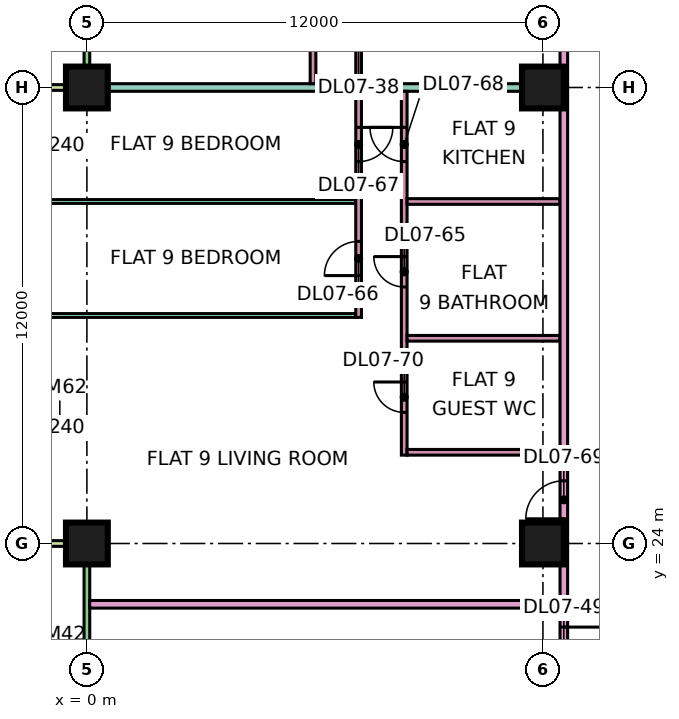
"""IFC4 building model, lengths in metres.
Left out: names, types, materials, properties, quantities, classifications, styles, units other than length and angle.
Written with IfcOpenShell. Run it as: python <this file> out.ifc"""

import sys

from ifc_helpers import new_model, si_unit, direction, frame, frame_2d, origin, origin_2d, place, context, subcontext, project, spatial, rectangle, extrude, element, fill, save


model = new_model("IFC4")
c1 = context("Model", 3, precision=1e-05, world=origin(), true_north=direction((0.0, 1.0)))
c2 = subcontext(c1, "Body", "Model", "MODEL_VIEW")
j1 = project(units=[si_unit("LENGTHUNIT", "METRE"), si_unit("PLANEANGLEUNIT", "RADIAN")], contexts=[c1])
p1 = place(None, origin())
s1 = spatial("IfcSite", under=j1, at=p1, CompositionType="ELEMENT")
p2 = place(p1, origin())
s2 = spatial("IfcBuilding", under=s1, at=p2, CompositionType="ELEMENT")
p3 = place(p2, frame((0.0, 0.0, 41.4)))
s3 = spatial("IfcBuildingStorey", under=s2, at=p3, CompositionType="ELEMENT", Elevation=41.4)
p4 = place(p3, frame((0.0, 24.0, 0.0), z_axis=(0.0, 0.0, 1.0), x_axis=(1.0, 0.0, 0.0)))
e1 = element("IfcColumn", 1, at=p4, inside=s3, PredefinedType="COLUMN", context=c2, shape_type="SweptSolid", body=[
    extrude(rectangle(XDim=1.1, YDim=1.1, at=origin_2d()), origin(), (0.0, 0.0, 1.0), 3.75),
])
p5 = place(p3, frame((0.0, 36.0, 0.0), z_axis=(0.0, 0.0, 1.0), x_axis=(1.0, 0.0, 0.0)))
e2 = element("IfcColumn", 2, at=p5, inside=s3, PredefinedType="COLUMN", context=c2, shape_type="SweptSolid", body=[
    extrude(rectangle(XDim=1.1, YDim=1.1, at=origin_2d()), origin(), (0.0, 0.0, 1.0), 3.75),
])
for number, where, z_axis, x_axis in (
    (3, (12.0, 24.0, 0.0), (0.0, 0.0, 1.0), (1.0, 0.0, 0.0)),
    (4, (12.0, 36.0, 0.0), (0.0, 0.0, 1.0), (1.0, 0.0, 0.0)),
):
    element("IfcColumn", number, at=place(p3, frame(where, z_axis=z_axis, x_axis=x_axis)), inside=s3, PredefinedType="COLUMN", context=c2, shape_type="SweptSolid", body=[
        extrude(rectangle(XDim=1.1, YDim=1.1, at=origin_2d()), origin(), (0.0, 0.0, 1.0), 3.75),
    ])
p6 = place(p3, frame((0.0, 47.925, 0.0), z_axis=(0.0, 0.0, 1.0), x_axis=(0.0, -1.0, 0.0)))
e5 = element("IfcWall", 5, at=p6, inside=s3, PredefinedType="SOLIDWALL", context=c2, shape_type="SweptSolid", body=[
    extrude(rectangle(XDim=11.85, YDim=0.15, at=frame_2d((5.925, 0.0))), origin(), (0.0, 0.0, 1.0), 3.35),
])
p7 = place(p6, frame((0.538, 0.0, 0.45)))
e6 = element("IfcOpeningElement", 6, at=p7, cuts=e5, PredefinedType="OPENING", context=c2, shape_type="SweptSolid", body=[
    extrude(rectangle(XDim=1.2, YDim=2.4, at=frame_2d((0.6, 1.2))), frame((0.0, 0.085, 0.0), z_axis=(0.0, -1.0, 0.0), x_axis=(1.0, 0.0, 0.0)), (0.0, 0.0, 1.0), 0.17),
])
p8 = place(p6, frame((5.35, 0.0, 0.0)))
e7 = element("IfcOpeningElement", 7, at=p8, cuts=e5, PredefinedType="OPENING", context=c2, shape_type="SweptSolid", body=[
    extrude(rectangle(XDim=1.8, YDim=2.4, at=frame_2d((0.9, 1.2))), frame((0.0, 0.085, 0.0), z_axis=(0.0, -1.0, 0.0), x_axis=(1.0, 0.0, 0.0)), (0.0, 0.0, 1.0), 0.17),
])
p9 = place(p6, frame((9.5, 0.0, 0.45)))
e8 = element("IfcOpeningElement", 8, at=p9, cuts=e5, PredefinedType="OPENING", context=c2, shape_type="SweptSolid", body=[
    extrude(rectangle(XDim=1.2, YDim=2.4, at=frame_2d((0.6, 1.2))), frame((0.0, 0.085, 0.0), z_axis=(0.0, -1.0, 0.0), x_axis=(1.0, 0.0, 0.0)), (0.0, 0.0, 1.0), 0.17),
])
p10 = place(p3, frame((-1.5, 36.0, 0.0), z_axis=(0.0, 0.0, 1.0), x_axis=(1.0, 0.0, 0.0)))
e9 = element("IfcWall", 9, at=p10, inside=s3, PredefinedType="SOLIDWALL", context=c2, shape_type="SweptSolid", body=[
    extrude(rectangle(XDim=1.5, YDim=0.15, at=frame_2d((0.75, 0.0))), origin(), (0.0, 0.0, 1.0), 3.35),
])
p11 = place(p3, frame((0.0, 23.925, 0.0), z_axis=(0.0, 0.0, 1.0), x_axis=(0.0, -1.0, 0.0)))
e10 = element("IfcWall", 10, at=p11, inside=s3, PredefinedType="SOLIDWALL", context=c2, shape_type="SweptSolid", body=[
    extrude(rectangle(XDim=11.35, YDim=0.15, at=frame_2d((5.675, 0.0))), origin(), (0.0, 0.0, 1.0), 3.35),
])
p12 = place(p11, frame((6.738, 0.0, 0.0)))
e11 = element("IfcOpeningElement", 11, at=p12, cuts=e10, PredefinedType="OPENING", context=c2, shape_type="SweptSolid", body=[
    extrude(rectangle(XDim=1.8, YDim=2.4, at=frame_2d((0.9, 1.2))), frame((0.0, 0.085, 0.0), z_axis=(0.0, -1.0, 0.0), x_axis=(1.0, 0.0, 0.0)), (0.0, 0.0, 1.0), 0.17),
])
p13 = place(p3, frame((-1.5, 24.0, 0.0), z_axis=(0.0, 0.0, 1.0), x_axis=(1.0, 0.0, 0.0)))
e12 = element("IfcWall", 12, at=p13, inside=s3, PredefinedType="SOLIDWALL", context=c2, shape_type="SweptSolid", body=[
    extrude(rectangle(XDim=1.5, YDim=0.15, at=frame_2d((0.75, 0.0))), origin(), (0.0, 0.0, 1.0), 3.35),
])
p14 = place(p3, frame((-1.351, 33.0, 0.0), z_axis=(0.0, 0.0, 1.0), x_axis=(1.0, 0.0, 0.0)))
e13 = element("IfcWall", 13, at=p14, inside=s3, PredefinedType="PARTITIONING", context=c2, shape_type="SweptSolid", body=[
    extrude(rectangle(XDim=8.426, YDim=0.1, at=frame_2d((4.213, 0.0))), origin(), (0.0, 0.0, 1.0), 3.35),
])
p15 = place(p3, frame((-1.35, 30.0, 0.0), z_axis=(0.0, 0.0, 1.0), x_axis=(1.0, 0.0, 0.0)))
e14 = element("IfcWall", 14, at=p15, inside=s3, PredefinedType="PARTITIONING", context=c2, shape_type="SweptSolid", body=[
    extrude(rectangle(XDim=8.425, YDim=0.1, at=frame_2d((4.212, 0.0))), origin(), (0.0, 0.0, 1.0), 3.35),
])
e15 = element("IfcWall", 15, at=p5, inside=s3, PredefinedType="PARTITIONING", context=c2, shape_type="SweptSolid", body=[
    extrude(rectangle(XDim=12.45, YDim=0.2, at=frame_2d((6.225, 0.0))), origin(), (0.0, 0.0, 1.0), 3.35),
])
p16 = place(p3, frame((0.074, 22.4, 0.0), z_axis=(0.0, 0.0, 1.0), x_axis=(1.0, 0.0, 0.0)))
e16 = element("IfcWall", 16, at=p16, inside=s3, PredefinedType="PARTITIONING", context=c2, shape_type="SweptSolid", body=[
    extrude(rectangle(XDim=12.376, YDim=0.2, at=frame_2d((6.188, 0.0))), origin(), (0.0, 0.0, 1.0), 3.35),
])
p17 = place(p3, frame((5.95, 36.1, 0.0), z_axis=(0.0, 0.0, 1.0), x_axis=(0.0, 1.0, 0.0)))
e17 = element("IfcWall", 17, at=p17, inside=s3, PredefinedType="PARTITIONING", context=c2, shape_type="SweptSolid", body=[
    extrude(rectangle(XDim=8.95, YDim=0.15, at=frame_2d((4.475, 0.0))), origin(), (0.0, 0.0, 1.0), 3.35),
])
p18 = place(p17, frame((0.95, 0.0, 0.0)))
e18 = element("IfcOpeningElement", 18, at=p18, cuts=e17, PredefinedType="OPENING", context=c2, shape_type="SweptSolid", body=[
    extrude(rectangle(XDim=0.9, YDim=2.1, at=frame_2d((0.45, 1.05))), frame((0.0, 0.085, 0.0), z_axis=(0.0, -1.0, 0.0), x_axis=(1.0, 0.0, 0.0)), (0.0, 0.0, 1.0), 0.17),
])
p19 = place(p17, frame((6.95, 0.0, 0.0)))
e19 = element("IfcOpeningElement", 19, at=p19, cuts=e17, PredefinedType="OPENING", context=c2, shape_type="SweptSolid", body=[
    extrude(rectangle(XDim=0.9, YDim=2.1, at=frame_2d((0.45, 1.05))), frame((0.0, 0.085, 0.0), z_axis=(0.0, -1.0, 0.0), x_axis=(1.0, 0.0, 0.0)), (0.0, 0.0, 1.0), 0.17),
])
p20 = place(p3, frame((7.15, 29.95, 0.0), z_axis=(0.0, 0.0, 1.0), x_axis=(0.0, 1.0, 0.0)))
e20 = element("IfcWall", 20, at=p20, inside=s3, PredefinedType="PARTITIONING", context=c2, shape_type="SweptSolid", body=[
    extrude(rectangle(XDim=5.95, YDim=0.15, at=frame_2d((2.975, 0.0))), origin(), (0.0, 0.0, 1.0), 3.35),
])
p21 = place(p20, frame((1.1, 0.0, 0.0)))
e21 = element("IfcOpeningElement", 21, at=p21, cuts=e20, PredefinedType="OPENING", context=c2, shape_type="SweptSolid", body=[
    extrude(rectangle(XDim=0.9, YDim=2.1, at=frame_2d((0.45, 1.05))), frame((0.0, 0.085, 0.0), z_axis=(0.0, -1.0, 0.0), x_axis=(1.0, 0.0, 0.0)), (0.0, 0.0, 1.0), 0.17),
])
p22 = place(p20, frame((4.1, 0.0, 0.0)))
e22 = element("IfcOpeningElement", 22, at=p22, cuts=e20, PredefinedType="OPENING", context=c2, shape_type="SweptSolid", body=[
    extrude(rectangle(XDim=0.9, YDim=2.1, at=frame_2d((0.45, 1.05))), frame((0.0, 0.085, 0.0), z_axis=(0.0, -1.0, 0.0), x_axis=(1.0, 0.0, 0.0)), (0.0, 0.0, 1.0), 0.17),
])
p23 = place(p3, frame((7.15, 36.1, 0.0), z_axis=(0.0, 0.0, 1.0), x_axis=(0.0, 1.0, 0.0)))
e23 = element("IfcWall", 23, at=p23, inside=s3, PredefinedType="PARTITIONING", context=c2, shape_type="SweptSolid", body=[
    extrude(rectangle(XDim=9.275, YDim=0.15, at=frame_2d((4.637, 0.0))), origin(), (0.0, 0.0, 1.0), 3.35),
])
p24 = place(p23, frame((7.4, 0.0, 0.0)))
e24 = element("IfcOpeningElement", 24, at=p24, cuts=e23, PredefinedType="OPENING", context=c2, shape_type="SweptSolid", body=[
    extrude(rectangle(XDim=0.8, YDim=2.1, at=frame_2d((0.4, 1.05))), frame((0.0, 0.085, 0.0), z_axis=(0.0, -1.0, 0.0), x_axis=(1.0, 0.0, 0.0)), (0.0, 0.0, 1.0), 0.17),
])
p25 = place(p23, frame((1.1, 0.0, 0.0)))
e25 = element("IfcOpeningElement", 25, at=p25, cuts=e23, PredefinedType="OPENING", context=c2, shape_type="SweptSolid", body=[
    extrude(rectangle(XDim=0.8, YDim=2.1, at=frame_2d((0.4, 1.05))), frame((0.0, 0.085, 0.0), z_axis=(0.0, -1.0, 0.0), x_axis=(1.0, 0.0, 0.0)), (0.0, 0.0, 1.0), 0.17),
])
p26 = place(p23, frame((4.4, 0.0, 0.0)))
e26 = element("IfcOpeningElement", 26, at=p26, cuts=e23, PredefinedType="OPENING", context=c2, shape_type="SweptSolid", body=[
    extrude(rectangle(XDim=0.8, YDim=2.1, at=frame_2d((0.4, 1.05))), frame((0.0, 0.085, 0.0), z_axis=(0.0, -1.0, 0.0), x_axis=(1.0, 0.0, 0.0)), (0.0, 0.0, 1.0), 0.17),
])
p27 = place(p3, frame((8.35, 26.325, 0.0), z_axis=(0.0, 0.0, 1.0), x_axis=(0.0, 1.0, 0.0)))
e27 = element("IfcWall", 27, at=p27, inside=s3, PredefinedType="PARTITIONING", context=c2, shape_type="SweptSolid", body=[
    extrude(rectangle(XDim=9.575, YDim=0.15, at=frame_2d((4.788, 0.0))), origin(), (0.0, 0.0, 1.0), 3.35),
])
p28 = place(p27, frame((4.425, 0.0, 0.0)))
e28 = element("IfcOpeningElement", 28, at=p28, cuts=e27, PredefinedType="OPENING", context=c2, shape_type="SweptSolid", body=[
    extrude(rectangle(XDim=0.8, YDim=2.1, at=frame_2d((0.4, 1.05))), frame((0.0, 0.085, 0.0), z_axis=(0.0, -1.0, 0.0), x_axis=(1.0, 0.0, 0.0)), (0.0, 0.0, 1.0), 0.17),
])
p29 = place(p27, frame((7.725, 0.0, 0.0)))
e29 = element("IfcOpeningElement", 29, at=p29, cuts=e27, PredefinedType="OPENING", context=c2, shape_type="SweptSolid", body=[
    extrude(rectangle(XDim=0.9, YDim=2.1, at=frame_2d((0.45, 1.05))), frame((0.0, 0.085, 0.0), z_axis=(0.0, -1.0, 0.0), x_axis=(1.0, 0.0, 0.0)), (0.0, 0.0, 1.0), 0.17),
])
p30 = place(p27, frame((1.125, 0.0, 0.0)))
e30 = element("IfcOpeningElement", 30, at=p30, cuts=e27, PredefinedType="OPENING", context=c2, shape_type="SweptSolid", body=[
    extrude(rectangle(XDim=0.8, YDim=2.1, at=frame_2d((0.4, 1.05))), frame((0.0, 0.085, 0.0), z_axis=(0.0, -1.0, 0.0), x_axis=(1.0, 0.0, 0.0)), (0.0, 0.0, 1.0), 0.17),
])
for number, where, z_axis, x_axis in (
    (31, (8.425, 26.4, 0.0), (0.0, 0.0, 1.0), (1.0, 0.0, 0.0)),
    (32, (8.425, 29.4, 0.0), (0.0, 0.0, 1.0), (1.0, 0.0, 0.0)),
    (33, (8.425, 33.0, 0.0), (0.0, 0.0, 1.0), (1.0, 0.0, 0.0)),
):
    element("IfcWall", number, at=place(p3, frame(where, z_axis=z_axis, x_axis=x_axis)), inside=s3, PredefinedType="PARTITIONING", context=c2, shape_type="SweptSolid", body=[
        extrude(rectangle(XDim=4.025, YDim=0.15, at=frame_2d((2.012, 0.0))), origin(), (0.0, 0.0, 1.0), 3.35),
    ])
p31 = place(p3, frame((12.55, 20.0, 0.0), z_axis=(0.0, 0.0, 1.0), x_axis=(0.0, 1.0, 0.0)))
e34 = element("IfcWall", 34, at=p31, inside=s3, PredefinedType="PARTITIONING", context=c2, shape_type="SweptSolid", body=[
    extrude(rectangle(XDim=42.926, YDim=0.2, at=frame_2d((21.463, 0.0))), origin(), (0.0, 0.0, 1.0), 3.35),
])
p32 = place(p31, frame((25.8, 0.0, 0.0)))
e35 = element("IfcOpeningElement", 35, at=p32, cuts=e34, PredefinedType="OPENING", context=c2, shape_type="SweptSolid", body=[
    extrude(rectangle(XDim=1.0, YDim=2.1, at=frame_2d((0.5, 1.05))), frame((0.0, 0.11, 0.0), z_axis=(0.0, -1.0, 0.0), x_axis=(1.0, 0.0, 0.0)), (0.0, 0.0, 1.0), 0.22),
])
p33 = place(p31, frame((37.65, 0.0, 0.0)))
e36 = element("IfcOpeningElement", 36, at=p33, cuts=e34, PredefinedType="OPENING", context=c2, shape_type="SweptSolid", body=[
    extrude(rectangle(XDim=1.0, YDim=2.1, at=frame_2d((0.5, 1.05))), frame((0.0, 0.11, 0.0), z_axis=(0.0, -1.0, 0.0), x_axis=(1.0, 0.0, 0.0)), (0.0, 0.0, 1.0), 0.22),
])
p34 = place(p31, frame((0.6, 0.0, 0.0)))
e37 = element("IfcOpeningElement", 37, at=p34, cuts=e34, PredefinedType="OPENING", context=c2, shape_type="SweptSolid", body=[
    extrude(rectangle(XDim=1.2, YDim=2.1, at=frame_2d((0.6, 1.05))), frame((0.0, 0.11, 0.0), z_axis=(0.0, -1.0, 0.0), x_axis=(1.0, 0.0, 0.0)), (0.0, 0.0, 1.0), 0.22),
])
p35 = place(p31, frame((4.65, 0.0, 0.0)))
e38 = element("IfcOpeningElement", 38, at=p35, cuts=e34, PredefinedType="OPENING", context=c2, shape_type="SweptSolid", body=[
    extrude(rectangle(XDim=1.0, YDim=2.1, at=frame_2d((0.5, 1.05))), frame((0.0, 0.11, 0.0), z_axis=(0.0, -1.0, 0.0), x_axis=(1.0, 0.0, 0.0)), (0.0, 0.0, 1.0), 0.22),
])
p36 = place(p34, origin())
e39 = element("IfcDoor", 39, at=p36, inside=s3, OperationType="SINGLE_SWING_RIGHT", PredefinedType="DOOR", context=c2, shape_type="SweptSolid", body=[
    extrude(rectangle(XDim=1.2, YDim=2.1, at=frame_2d((0.6, 1.05))), frame((0.0, 0.025, 0.0), z_axis=(0.0, -1.0, 0.0), x_axis=(1.0, 0.0, 0.0)), (0.0, 0.0, 1.0), 0.05),
])
fill(e37, e39)
p37 = place(p28, frame((0.8, 0.0, 0.0), z_axis=(0.0, 0.0, 1.0), x_axis=(-1.0, 0.0, 0.0)))
e40 = element("IfcDoor", 40, at=p37, inside=s3, OperationType="SINGLE_SWING_RIGHT", PredefinedType="DOOR", context=c2, shape_type="SweptSolid", body=[
    extrude(rectangle(XDim=0.8, YDim=2.1, at=frame_2d((0.4, 1.05))), frame((0.0, 0.025, 0.0), z_axis=(0.0, -1.0, 0.0), x_axis=(1.0, 0.0, 0.0)), (0.0, 0.0, 1.0), 0.05),
])
fill(e28, e40)
p38 = place(p21, origin())
e41 = element("IfcDoor", 41, at=p38, inside=s3, OperationType="SINGLE_SWING_LEFT", PredefinedType="DOOR", context=c2, shape_type="SweptSolid", body=[
    extrude(rectangle(XDim=0.9, YDim=2.1, at=frame_2d((0.45, 1.05))), frame((0.0, 0.025, 0.0), z_axis=(0.0, -1.0, 0.0), x_axis=(1.0, 0.0, 0.0)), (0.0, 0.0, 1.0), 0.05),
])
fill(e21, e41)
p39 = place(p22, origin())
e42 = element("IfcDoor", 42, at=p39, inside=s3, OperationType="SINGLE_SWING_RIGHT", PredefinedType="DOOR", context=c2, shape_type="SweptSolid", body=[
    extrude(rectangle(XDim=0.9, YDim=2.1, at=frame_2d((0.45, 1.05))), frame((0.0, 0.025, 0.0), z_axis=(0.0, -1.0, 0.0), x_axis=(1.0, 0.0, 0.0)), (0.0, 0.0, 1.0), 0.05),
])
fill(e22, e42)
p40 = place(p29, frame((0.9, 0.0, 0.0), z_axis=(0.0, 0.0, 1.0), x_axis=(-1.0, 0.0, 0.0)))
e43 = element("IfcDoor", 43, at=p40, inside=s3, OperationType="SINGLE_SWING_RIGHT", PredefinedType="DOOR", context=c2, shape_type="SweptSolid", body=[
    extrude(rectangle(XDim=0.9, YDim=2.1, at=frame_2d((0.45, 1.05))), frame((0.0, 0.025, 0.0), z_axis=(0.0, -1.0, 0.0), x_axis=(1.0, 0.0, 0.0)), (0.0, 0.0, 1.0), 0.05),
])
fill(e29, e43)
p41 = place(p35, origin())
e44 = element("IfcDoor", 44, at=p41, inside=s3, OperationType="SINGLE_SWING_LEFT", PredefinedType="DOOR", context=c2, shape_type="SweptSolid", body=[
    extrude(rectangle(XDim=1.0, YDim=2.1, at=frame_2d((0.5, 1.05))), frame((0.0, 0.025, 0.0), z_axis=(0.0, -1.0, 0.0), x_axis=(1.0, 0.0, 0.0)), (0.0, 0.0, 1.0), 0.05),
])
fill(e38, e44)
p42 = place(p30, frame((0.8, 0.0, 0.0), z_axis=(0.0, 0.0, 1.0), x_axis=(-1.0, 0.0, 0.0)))
e45 = element("IfcDoor", 45, at=p42, inside=s3, OperationType="SINGLE_SWING_RIGHT", PredefinedType="DOOR", context=c2, shape_type="SweptSolid", body=[
    extrude(rectangle(XDim=0.8, YDim=2.1, at=frame_2d((0.4, 1.05))), frame((0.0, 0.025, 0.0), z_axis=(0.0, -1.0, 0.0), x_axis=(1.0, 0.0, 0.0)), (0.0, 0.0, 1.0), 0.05),
])
fill(e30, e45)
save(model, sys.argv[1])
